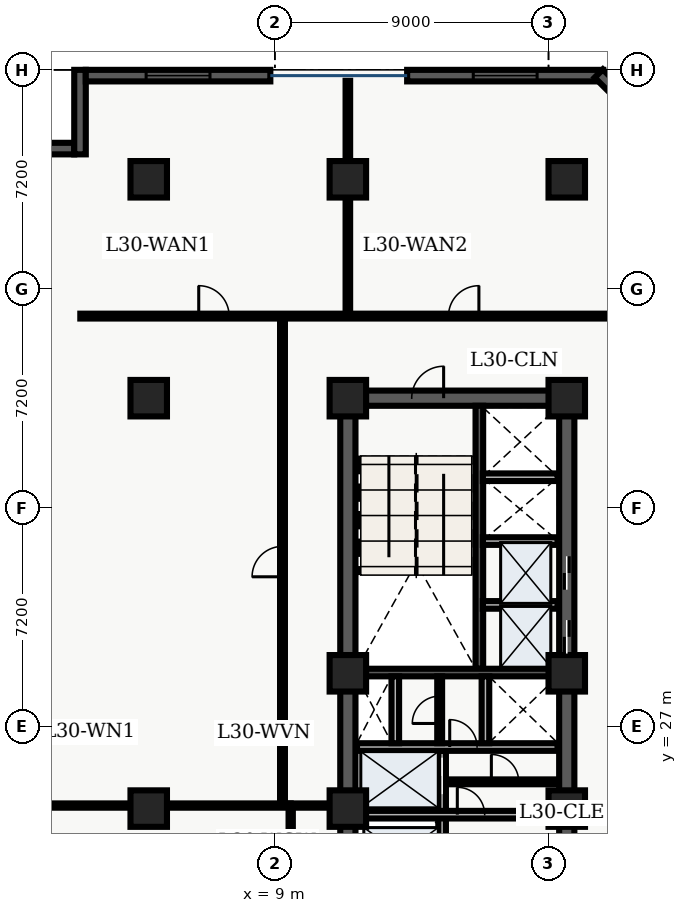
"""IFC4 building model, lengths in metres.
Left out: names, types, materials, properties, quantities, classifications, styles, units other than length and angle.
Written with IfcOpenShell. Run it as: python <this file> out.ifc"""

import sys

from ifc_helpers import new_model, entity, si_unit, converted_unit, direction, frame, origin_with_axes, origin_2d_with_axis, place, context, subcontext, project, spatial, polyline, rectangle, outline, extrude, element, fill, save


model = new_model("IFC4")
c1 = context("Model", 3, precision=1e-05, world=origin_with_axes(), true_north=direction((0.0, 1.0)))
c2 = subcontext(c1, "Body", "Model", "MODEL_VIEW")
j1 = project(units=[si_unit("LENGTHUNIT", "METRE"), converted_unit("PLANEANGLEUNIT", "DEGREE", entity("IfcPlaneAngleMeasure", 0.017), si_unit("PLANEANGLEUNIT", "RADIAN"), dimensions=[0, 0, 0, 0, 0, 0, 0])], contexts=[c1])
p1 = place(None, origin_with_axes())
s1 = spatial("IfcSite", under=j1, at=p1, CompositionType="ELEMENT")
p2 = place(p1, origin_with_axes())
s2 = spatial("IfcBuilding", under=s1, at=p2, CompositionType="ELEMENT")
p3 = place(p2, frame((0.0, 0.0, 124.2), z_axis=(0.0, 0.0, 1.0), x_axis=(1.0, 0.0, 0.0)))
s3 = spatial("IfcBuildingStorey", under=s2, at=p3, CompositionType="ELEMENT", Elevation=124.2)
p4 = place(p3, frame((11.4, 10.8, 0.0), z_axis=(0.0, 0.0, 1.0), x_axis=(0.0, 1.0, 0.0)))
e1 = element("IfcWall", 1, at=p4, inside=s3, PredefinedType="SHEAR", context=c2, shape_type="SweptSolid", body=[
    extrude(outline(polyline([(0.0, -0.25), (27.0, -0.25), (27.0, 0.25), (0.0, 0.25), (0.0, -0.25)])), origin_with_axes(), (0.0, 0.0, 1.0), 4.56),
])
p5 = place(p3, frame((11.4, 37.8, 0.0), z_axis=(0.0, 0.0, 1.0), x_axis=(1.0, 0.0, 0.0)))
e2 = element("IfcWall", 2, at=p5, inside=s3, PredefinedType="SHEAR", context=c2, shape_type="SweptSolid", body=[
    extrude(outline(polyline([(0.0, -0.25), (7.2, -0.25), (7.2, 0.25), (0.0, 0.25), (0.0, -0.25)])), origin_with_axes(), (0.0, 0.0, 1.0), 4.56),
])
p6 = place(p5, frame((2.625, 0.0, 0.0), z_axis=(0.0, 0.0, 1.0), x_axis=(1.0, 0.0, 0.0)))
e3 = element("IfcOpeningElement", 3, at=p6, cuts=e2, PredefinedType="OPENING", context=c2, shape_type="SweptSolid", body=[
    extrude(rectangle(XDim=1.05, YDim=0.52, at=origin_2d_with_axis()), origin_with_axes(), (0.0, 0.0, 1.0), 2.15),
])
p7 = place(p3, frame((18.6, 10.8, 0.0), z_axis=(0.0, 0.0, 1.0), x_axis=(0.0, 1.0, 0.0)))
e4 = element("IfcWall", 4, at=p7, inside=s3, PredefinedType="SHEAR", context=c2, shape_type="SweptSolid", body=[
    extrude(outline(polyline([(0.0, -0.25), (13.5, -0.25), (13.5, 0.25), (0.0, 0.25), (0.0, -0.25)])), origin_with_axes(), (0.0, 0.0, 1.0), 4.56),
])
p8 = place(p7, frame((5.6, 0.0, 0.0), z_axis=(0.0, 0.0, 1.0), x_axis=(1.0, 0.0, 0.0)))
e5 = element("IfcOpeningElement", 5, at=p8, cuts=e4, PredefinedType="OPENING", context=c2, shape_type="SweptSolid", body=[
    extrude(rectangle(XDim=1.1, YDim=0.52, at=origin_2d_with_axis()), origin_with_axes(), (0.0, 0.0, 1.0), 2.15),
])
p9 = place(p7, frame((7.8, 0.0, 0.0), z_axis=(0.0, 0.0, 1.0), x_axis=(1.0, 0.0, 0.0)))
e6 = element("IfcOpeningElement", 6, at=p9, cuts=e4, PredefinedType="OPENING", context=c2, shape_type="SweptSolid", body=[
    extrude(rectangle(XDim=1.1, YDim=0.52, at=origin_2d_with_axis()), origin_with_axes(), (0.0, 0.0, 1.0), 2.15),
])
p10 = place(p7, frame((11.125, 0.0, 0.0), z_axis=(0.0, 0.0, 1.0), x_axis=(1.0, 0.0, 0.0)))
e7 = element("IfcOpeningElement", 7, at=p10, cuts=e4, PredefinedType="OPENING", context=c2, shape_type="SweptSolid", body=[
    extrude(rectangle(XDim=1.05, YDim=0.52, at=origin_2d_with_axis()), origin_with_axes(), (0.0, 0.0, 1.0), 2.15),
])
p11 = place(p7, frame((2.425, 0.0, 0.0), z_axis=(0.0, 0.0, 1.0), x_axis=(1.0, 0.0, 0.0)))
e8 = element("IfcOpeningElement", 8, at=p11, cuts=e4, PredefinedType="OPENING", context=c2, shape_type="SweptSolid", body=[
    extrude(rectangle(XDim=1.05, YDim=0.52, at=origin_2d_with_axis()), origin_with_axes(), (0.0, 0.0, 1.0), 2.15),
])
p12 = place(p3, frame((18.6, 24.3, 0.0), z_axis=(0.0, 0.0, 1.0), x_axis=(0.0, 1.0, 0.0)))
e9 = element("IfcWall", 9, at=p12, inside=s3, PredefinedType="SHEAR", context=c2, shape_type="SweptSolid", body=[
    extrude(outline(polyline([(0.0, -0.25), (13.5, -0.25), (13.5, 0.25), (0.0, 0.25), (0.0, -0.25)])), origin_with_axes(), (0.0, 0.0, 1.0), 4.56),
])
p13 = place(p12, frame((5.65, 0.0, 0.0), z_axis=(0.0, 0.0, 1.0), x_axis=(1.0, 0.0, 0.0)))
e10 = element("IfcOpeningElement", 10, at=p13, cuts=e9, PredefinedType="OPENING", context=c2, shape_type="SweptSolid", body=[
    extrude(rectangle(XDim=1.1, YDim=0.52, at=origin_2d_with_axis()), origin_with_axes(), (0.0, 0.0, 1.0), 2.15),
])
p14 = place(p12, frame((7.75, 0.0, 0.0), z_axis=(0.0, 0.0, 1.0), x_axis=(1.0, 0.0, 0.0)))
e11 = element("IfcOpeningElement", 11, at=p14, cuts=e9, PredefinedType="OPENING", context=c2, shape_type="SweptSolid", body=[
    extrude(rectangle(XDim=1.1, YDim=0.52, at=origin_2d_with_axis()), origin_with_axes(), (0.0, 0.0, 1.0), 2.15),
])
p15 = place(p3, frame((15.725, 28.9, 0.0), z_axis=(0.0, 0.0, 1.0), x_axis=(0.0, 1.0, 0.0)))
e12 = element("IfcWall", 12, at=p15, inside=s3, PredefinedType="SHEAR", context=c2, shape_type="SweptSolid", body=[
    extrude(outline(polyline([(0.0, -0.125), (8.65, -0.125), (8.65, 0.125), (0.0, 0.125), (0.0, -0.125)])), origin_with_axes(), (0.0, 0.0, 1.0), 4.56),
])
p16 = place(p3, frame((11.65, 28.775, 0.0), z_axis=(0.0, 0.0, 1.0), x_axis=(1.0, 0.0, 0.0)))
e13 = element("IfcWall", 13, at=p16, inside=s3, PredefinedType="SHEAR", context=c2, shape_type="SweptSolid", body=[
    extrude(outline(polyline([(0.0, -0.125), (6.7, -0.125), (6.7, 0.125), (0.0, 0.125), (0.0, -0.125)])), origin_with_axes(), (0.0, 0.0, 1.0), 4.56),
])
p17 = place(p3, frame((14.5, 19.95, 0.0), z_axis=(0.0, 0.0, 1.0), x_axis=(0.0, 1.0, 0.0)))
e14 = element("IfcWall", 14, at=p17, inside=s3, PredefinedType="SOLIDWALL", context=c2, shape_type="SweptSolid", body=[
    extrude(outline(polyline([(0.0, -0.125), (6.25, -0.125), (6.25, 0.125), (0.0, 0.125), (0.0, -0.125)])), origin_with_axes(), (0.0, 0.0, 1.0), 3.6),
])
p18 = place(p17, frame((1.025, 0.0, 0.0), z_axis=(0.0, 0.0, 1.0), x_axis=(1.0, 0.0, 0.0)))
e15 = element("IfcOpeningElement", 15, at=p18, cuts=e14, PredefinedType="OPENING", context=c2, shape_type="SweptSolid", body=[
    extrude(rectangle(XDim=1.1, YDim=0.27, at=origin_2d_with_axis()), origin_with_axes(), (0.0, 0.0, 1.0), 2.15),
])
p19 = place(p17, frame((2.975, 0.0, 0.0), z_axis=(0.0, 0.0, 1.0), x_axis=(1.0, 0.0, 0.0)))
e16 = element("IfcOpeningElement", 16, at=p19, cuts=e14, PredefinedType="OPENING", context=c2, shape_type="SweptSolid", body=[
    extrude(rectangle(XDim=1.1, YDim=0.27, at=origin_2d_with_axis()), origin_with_axes(), (0.0, 0.0, 1.0), 2.15),
])
p20 = place(p17, frame((5.425, 0.0, 0.0), z_axis=(0.0, 0.0, 1.0), x_axis=(1.0, 0.0, 0.0)))
e17 = element("IfcOpeningElement", 17, at=p20, cuts=e14, PredefinedType="OPENING", context=c2, shape_type="SweptSolid", body=[
    extrude(rectangle(XDim=1.2, YDim=0.27, at=origin_2d_with_axis()), origin_with_axes(), (0.0, 0.0, 1.0), 2.15),
])
p21 = place(p3, frame((11.7, 24.1, 0.0), z_axis=(0.0, 0.0, 1.0), x_axis=(1.0, 0.0, 0.0)))
e18 = element("IfcWall", 18, at=p21, inside=s3, PredefinedType="SOLIDWALL", context=c2, shape_type="SweptSolid", body=[
    extrude(outline(polyline([(0.0, -0.125), (6.6, -0.125), (6.6, 0.125), (0.0, 0.125), (0.0, -0.125)])), origin_with_axes(), (0.0, 0.0, 1.0), 3.6),
])
p22 = place(p21, frame((3.75, 0.0, 0.0), z_axis=(0.0, 0.0, 1.0), x_axis=(1.0, 0.0, 0.0)))
e19 = element("IfcOpeningElement", 19, at=p22, cuts=e18, PredefinedType="OPENING", context=c2, shape_type="SweptSolid", body=[
    extrude(rectangle(XDim=0.9, YDim=0.27, at=origin_2d_with_axis()), origin_with_axes(), (0.0, 0.0, 1.0), 2.15),
])
p23 = place(p3, frame((11.7, 26.325, 0.0), z_axis=(0.0, 0.0, 1.0), x_axis=(1.0, 0.0, 0.0)))
e20 = element("IfcWall", 20, at=p23, inside=s3, PredefinedType="SOLIDWALL", context=c2, shape_type="SweptSolid", body=[
    extrude(outline(polyline([(0.0, -0.125), (6.6, -0.125), (6.6, 0.125), (0.0, 0.125), (0.0, -0.125)])), origin_with_axes(), (0.0, 0.0, 1.0), 3.6),
])
p24 = place(p23, frame((3.5, 0.0, 0.0), z_axis=(0.0, 0.0, 1.0), x_axis=(1.0, 0.0, 0.0)))
e21 = element("IfcOpeningElement", 21, at=p24, cuts=e20, PredefinedType="OPENING", context=c2, shape_type="SweptSolid", body=[
    extrude(rectangle(XDim=0.9, YDim=0.27, at=origin_2d_with_axis()), origin_with_axes(), (0.0, 0.0, 1.0), 2.15),
])
for number, where, z_axis, x_axis in (
    (22, (12.96, 26.45, 0.0), (0.0, 0.0, 1.0), (0.0, 1.0, 0.0)),
    (23, (15.925, 26.45, 0.0), (0.0, 0.0, 1.0), (0.0, 1.0, 0.0)),
):
    element("IfcWall", number, at=place(p3, frame(where, z_axis=z_axis, x_axis=x_axis)), inside=s3, PredefinedType="SOLIDWALL", context=c2, shape_type="SweptSolid", body=[
        extrude(outline(polyline([(0.0, -0.125), (2.2, -0.125), (2.2, 0.125), (0.0, 0.125), (0.0, -0.125)])), origin_with_axes(), (0.0, 0.0, 1.0), 3.6),
    ])
for number, where, z_axis, x_axis in (
    (24, (11.4, 24.3, 0.0), (0.0, 0.0, 1.0), (1.0, 0.0, 0.0)),
    (25, (11.4, 28.75, 0.0), (0.0, 0.0, 1.0), (1.0, 0.0, 0.0)),
    (26, (11.4, 37.8, 0.0), (0.0, 0.0, 1.0), (1.0, 0.0, 0.0)),
    (27, (11.4, 45.0, 0.0), (0.0, 0.0, 1.0), (1.0, 0.0, 0.0)),
    (28, (18.6, 24.3, 0.0), (0.0, 0.0, 1.0), (1.0, 0.0, 0.0)),
    (29, (18.6, 28.75, 0.0), (0.0, 0.0, 1.0), (1.0, 0.0, 0.0)),
    (30, (18.6, 37.8, 0.0), (0.0, 0.0, 1.0), (1.0, 0.0, 0.0)),
    (31, (18.6, 45.0, 0.0), (0.0, 0.0, 1.0), (1.0, 0.0, 0.0)),
    (32, (4.85, 24.3, 0.0), (0.0, 0.0, 1.0), (1.0, 0.0, 0.0)),
    (33, (4.85, 37.8, 0.0), (0.0, 0.0, 1.0), (1.0, 0.0, 0.0)),
    (34, (4.85, 45.0, 0.0), (0.0, 0.0, 1.0), (1.0, 0.0, 0.0)),
):
    element("IfcColumn", number, at=place(p3, frame(where, z_axis=z_axis, x_axis=x_axis)), inside=s3, PredefinedType="COLUMN", context=c2, shape_type="SweptSolid", body=[
        extrude(rectangle(XDim=1.2, YDim=1.2, at=origin_2d_with_axis()), origin_with_axes(), (0.0, 0.0, 1.0), 4.8),
    ])
p25 = place(p3, frame((14.62, 25.18, 0.0), z_axis=(0.0, 0.0, 1.0), x_axis=(1.0, 0.0, 0.0)))
e35 = element("IfcWall", 35, at=p25, inside=s3, PredefinedType="PARTITIONING", context=c2, shape_type="SweptSolid", body=[
    extrude(outline(polyline([(0.0, -0.08), (3.68, -0.08), (3.68, 0.08), (0.0, 0.08), (0.0, -0.08)])), origin_with_axes(), (0.0, 0.0, 1.0), 3.2),
])
p26 = place(p25, frame((1.95, 0.0, 0.0), z_axis=(0.0, 0.0, 1.0), x_axis=(1.0, 0.0, 0.0)))
e36 = element("IfcOpeningElement", 36, at=p26, cuts=e35, PredefinedType="OPENING", context=c2, shape_type="SweptSolid", body=[
    extrude(rectangle(XDim=0.9, YDim=0.18, at=origin_2d_with_axis()), origin_with_axes(), (0.0, 0.0, 1.0), 2.15),
])
p27 = place(p3, frame((14.42, 26.45, 0.0), z_axis=(0.0, 0.0, 1.0), x_axis=(0.0, 1.0, 0.0)))
e37 = element("IfcWall", 37, at=p27, inside=s3, PredefinedType="PARTITIONING", context=c2, shape_type="SweptSolid", body=[
    extrude(outline(polyline([(0.0, -0.08), (2.2, -0.08), (2.2, 0.08), (0.0, 0.08), (0.0, -0.08)])), origin_with_axes(), (0.0, 0.0, 1.0), 3.2),
])
p28 = place(p27, frame((1.1, 0.0, 0.0), z_axis=(0.0, 0.0, 1.0), x_axis=(1.0, 0.0, 0.0)))
e38 = element("IfcOpeningElement", 38, at=p28, cuts=e37, PredefinedType="OPENING", context=c2, shape_type="SweptSolid", body=[
    extrude(rectangle(XDim=0.9, YDim=0.18, at=origin_2d_with_axis()), origin_with_axes(), (0.0, 0.0, 1.0), 2.15),
])
for number, where, z_axis, x_axis in (
    (39, (15.84, 31.0, 0.0), (0.0, 0.0, 1.0), (1.0, 0.0, 0.0)),
    (40, (15.84, 33.1, 0.0), (0.0, 0.0, 1.0), (1.0, 0.0, 0.0)),
    (41, (15.84, 35.2, 0.0), (0.0, 0.0, 1.0), (1.0, 0.0, 0.0)),
):
    element("IfcWall", number, at=place(p3, frame(where, z_axis=z_axis, x_axis=x_axis)), inside=s3, PredefinedType="SOLIDWALL", context=c2, shape_type="SweptSolid", body=[
        extrude(outline(polyline([(0.0, -0.125), (2.46, -0.125), (2.46, 0.125), (0.0, 0.125), (0.0, -0.125)])), origin_with_axes(), (0.0, 0.0, 1.0), 3.2),
    ])
p29 = place(p3, frame((9.52, 20.4, 0.0), z_axis=(0.0, 0.0, 1.0), x_axis=(0.0, 1.0, 0.0)))
e42 = element("IfcWall", 42, at=p29, inside=s3, PredefinedType="PARTITIONING", context=c2, shape_type="SweptSolid", body=[
    extrude(outline(polyline([(0.0, -0.07), (4.0, -0.07), (4.0, 0.07), (0.0, 0.07), (0.0, -0.07)])), origin_with_axes(), (0.0, 0.0, 1.0), 3.2),
])
p30 = place(p3, frame((9.52, 24.4, 0.0), z_axis=(0.0, 0.0, 1.0), x_axis=(1.0, 0.0, 0.0)))
e43 = element("IfcWall", 43, at=p30, inside=s3, PredefinedType="PARTITIONING", context=c2, shape_type="SweptSolid", body=[
    extrude(outline(polyline([(0.0, -0.07), (1.58, -0.07), (1.58, 0.07), (0.0, 0.07), (0.0, -0.07)])), origin_with_axes(), (0.0, 0.0, 1.0), 3.2),
])
p31 = place(p3, frame((2.6, 40.5, 0.0), z_axis=(0.0, 0.0, 1.0), x_axis=(1.0, 0.0, 0.0)))
e44 = element("IfcWall", 44, at=p31, inside=s3, PredefinedType="PARTITIONING", context=c2, shape_type="SweptSolid", body=[
    extrude(outline(polyline([(0.0, -0.08), (18.65, -0.08), (18.65, 0.08), (0.0, 0.08), (0.0, -0.08)])), origin_with_axes(), (0.0, 0.0, 1.0), 3.2),
])
p32 = place(p31, frame((4.395, 0.0, 0.0), z_axis=(0.0, 0.0, 1.0), x_axis=(1.0, 0.0, 0.0)))
e45 = element("IfcOpeningElement", 45, at=p32, cuts=e44, PredefinedType="OPENING", context=c2, shape_type="SweptSolid", body=[
    extrude(rectangle(XDim=1.0, YDim=0.18, at=origin_2d_with_axis()), origin_with_axes(), (0.0, 0.0, 1.0), 2.15),
])
p33 = place(p31, frame((12.61, 0.0, 0.0), z_axis=(0.0, 0.0, 1.0), x_axis=(1.0, 0.0, 0.0)))
e46 = element("IfcOpeningElement", 46, at=p33, cuts=e44, PredefinedType="OPENING", context=c2, shape_type="SweptSolid", body=[
    extrude(rectangle(XDim=1.0, YDim=0.18, at=origin_2d_with_axis()), origin_with_axes(), (0.0, 0.0, 1.0), 2.15),
])
p34 = place(p3, frame((9.25, 24.4, 0.0), z_axis=(0.0, 0.0, 1.0), x_axis=(0.0, 1.0, 0.0)))
e47 = element("IfcWall", 47, at=p34, inside=s3, PredefinedType="PARTITIONING", context=c2, shape_type="SweptSolid", body=[
    extrude(outline(polyline([(0.0, -0.08), (16.1, -0.08), (16.1, 0.08), (0.0, 0.08), (0.0, -0.08)])), origin_with_axes(), (0.0, 0.0, 1.0), 3.2),
])
p35 = place(p34, frame((8.025, 0.0, 0.0), z_axis=(0.0, 0.0, 1.0), x_axis=(1.0, 0.0, 0.0)))
e48 = element("IfcOpeningElement", 48, at=p35, cuts=e47, PredefinedType="OPENING", context=c2, shape_type="SweptSolid", body=[
    extrude(rectangle(XDim=1.0, YDim=0.18, at=origin_2d_with_axis()), origin_with_axes(), (0.0, 0.0, 1.0), 2.15),
])
p36 = place(p3, frame((0.36, 24.4, 0.0), z_axis=(0.0, 0.0, 1.0), x_axis=(1.0, 0.0, 0.0)))
e49 = element("IfcWall", 49, at=p36, inside=s3, PredefinedType="PARTITIONING", context=c2, shape_type="SweptSolid", body=[
    extrude(outline(polyline([(0.0, -0.07), (9.16, -0.07), (9.16, 0.07), (0.0, 0.07), (0.0, -0.07)])), origin_with_axes(), (0.0, 0.0, 1.0), 3.2),
])
p37 = place(p3, frame((11.4, 40.6, 0.0), z_axis=(0.0, 0.0, 1.0), x_axis=(0.0, 1.0, 0.0)))
e50 = element("IfcWall", 50, at=p37, inside=s3, PredefinedType="PARTITIONING", context=c2, shape_type="SweptSolid", body=[
    extrude(outline(polyline([(0.0, -0.075), (7.64, -0.075), (7.64, 0.075), (0.0, 0.075), (0.0, -0.075)])), origin_with_axes(), (0.0, 0.0, 1.0), 3.2),
])
p38 = place(p3, frame((0.38, 46.01, 0.0), z_axis=(0.0, 0.0, 1.0), x_axis=(1.0, 0.0, 0.0)))
e51 = element("IfcWall", 51, at=p38, inside=s3, PredefinedType="SOLIDWALL", context=c2, shape_type="SweptSolid", body=[
    extrude(outline(polyline([(0.0, -0.19), (2.02, -0.19), (2.02, 0.19), (0.0, 0.19), (0.0, -0.19)])), origin_with_axes(), (0.0, 0.0, 1.0), 4.56),
])
p39 = place(p3, frame((2.59, 45.82, 0.0), z_axis=(0.0, 0.0, 1.0), x_axis=(0.0, 1.0, 0.0)))
e52 = element("IfcWall", 52, at=p39, inside=s3, PredefinedType="SOLIDWALL", context=c2, shape_type="SweptSolid", body=[
    extrude(outline(polyline([(0.0, -0.19), (2.78, -0.19), (2.78, 0.19), (0.0, 0.19), (0.0, -0.19)])), origin_with_axes(), (0.0, 0.0, 1.0), 4.56),
])
p40 = place(p3, frame((2.78, 48.41, 0.0), z_axis=(0.0, 0.0, 1.0), x_axis=(1.0, 0.0, 0.0)))
e53 = element("IfcWall", 53, at=p40, inside=s3, PredefinedType="SOLIDWALL", context=c2, shape_type="SweptSolid", body=[
    extrude(outline(polyline([(0.0, -0.19), (6.07, -0.19), (6.07, 0.19), (0.0, 0.19), (0.0, -0.19)])), origin_with_axes(), (0.0, 0.0, 1.0), 4.56),
])
p41 = place(p40, frame((3.035, 0.0, 0.45), z_axis=(0.0, 0.0, 1.0), x_axis=(1.0, 0.0, 0.0)))
e54 = element("IfcOpeningElement", 54, at=p41, cuts=e53, PredefinedType="OPENING", context=c2, shape_type="SweptSolid", body=[
    extrude(rectangle(XDim=2.1, YDim=0.4, at=origin_2d_with_axis()), origin_with_axes(), (0.0, 0.0, 1.0), 2.2),
])
p42 = place(p3, frame((13.35, 48.41, 0.0), z_axis=(0.0, 0.0, 1.0), x_axis=(1.0, 0.0, 0.0)))
e55 = element("IfcWall", 55, at=p42, inside=s3, PredefinedType="SOLIDWALL", context=c2, shape_type="SweptSolid", body=[
    extrude(outline(polyline([(0.0, -0.19), (6.45, -0.19), (6.45, 0.19), (0.0, 0.19), (0.0, -0.19)])), origin_with_axes(), (0.0, 0.0, 1.0), 4.56),
])
p43 = place(p42, frame((3.225, 0.0, 0.45), z_axis=(0.0, 0.0, 1.0), x_axis=(1.0, 0.0, 0.0)))
e56 = element("IfcOpeningElement", 56, at=p43, cuts=e55, PredefinedType="OPENING", context=c2, shape_type="SweptSolid", body=[
    extrude(rectangle(XDim=2.1, YDim=0.4, at=origin_2d_with_axis()), origin_with_axes(), (0.0, 0.0, 1.0), 2.2),
])
p44 = place(p3, frame((19.652, 48.48, 0.0), z_axis=(0.0, 0.0, 1.0), x_axis=(0.707107, -0.707107, 0.0)))
e57 = element("IfcWall", 57, at=p44, inside=s3, PredefinedType="SOLIDWALL", context=c2, shape_type="SweptSolid", body=[
    extrude(outline(polyline([(0.0, -0.19), (2.565, -0.19), (2.565, 0.19), (0.0, 0.19), (0.0, -0.19)])), origin_with_axes(), (0.0, 0.0, 1.0), 4.56),
])
p45 = place(p12, frame((5.65, 0.0, 0.0), z_axis=(0.0, 0.0, 1.0), x_axis=(1.0, 0.0, 0.0)))
e58 = element("IfcDoor", 58, at=p45, inside=s3, OperationType="SLIDING_TO_LEFT", PredefinedType="DOOR", context=c2, shape_type="SweptSolid", body=[
    extrude(rectangle(XDim=1.1, YDim=0.09, at=origin_2d_with_axis()), origin_with_axes(), (0.0, 0.0, 1.0), 2.15),
])
fill(e10, e58)
p46 = place(p12, frame((7.75, 0.0, 0.0), z_axis=(0.0, 0.0, 1.0), x_axis=(1.0, 0.0, 0.0)))
e59 = element("IfcDoor", 59, at=p46, inside=s3, OperationType="SLIDING_TO_RIGHT", PredefinedType="DOOR", context=c2, shape_type="SweptSolid", body=[
    extrude(rectangle(XDim=1.1, YDim=0.09, at=origin_2d_with_axis()), origin_with_axes(), (0.0, 0.0, 1.0), 2.15),
])
fill(e11, e59)
p47 = place(p17, frame((5.425, 0.0, 0.0), z_axis=(0.0, 0.0, 1.0), x_axis=(1.0, 0.0, 0.0)))
e60 = element("IfcDoor", 60, at=p47, inside=s3, OperationType="DOUBLE_DOOR_SLIDING", PredefinedType="DOOR", context=c2, shape_type="SweptSolid", body=[
    extrude(rectangle(XDim=1.2, YDim=0.09, at=origin_2d_with_axis()), origin_with_axes(), (0.0, 0.0, 1.0), 2.15),
])
fill(e17, e60)
p48 = place(p5, frame((2.625, 0.0, 0.0), z_axis=(0.0, 0.0, 1.0), x_axis=(1.0, 0.0, 0.0)))
e61 = element("IfcDoor", 61, at=p48, inside=s3, OperationType="SINGLE_SWING_RIGHT", PredefinedType="DOOR", context=c2, shape_type="SweptSolid", body=[
    extrude(rectangle(XDim=1.05, YDim=0.09, at=origin_2d_with_axis()), origin_with_axes(), (0.0, 0.0, 1.0), 2.15),
])
fill(e3, e61)
p49 = place(p23, frame((3.5, 0.0, 0.0), z_axis=(0.0, 0.0, 1.0), x_axis=(1.0, 0.0, 0.0)))
e62 = element("IfcDoor", 62, at=p49, inside=s3, OperationType="SINGLE_SWING_LEFT", PredefinedType="DOOR", context=c2, shape_type="SweptSolid", body=[
    extrude(rectangle(XDim=0.9, YDim=0.09, at=origin_2d_with_axis()), origin_with_axes(), (0.0, 0.0, 1.0), 2.15),
])
fill(e21, e62)
p50 = place(p27, frame((1.1, 0.0, 0.0), z_axis=(0.0, 0.0, 1.0), x_axis=(1.0, 0.0, 0.0)))
e63 = element("IfcDoor", 63, at=p50, inside=s3, OperationType="SINGLE_SWING_LEFT", PredefinedType="DOOR", context=c2, shape_type="SweptSolid", body=[
    extrude(rectangle(XDim=0.9, YDim=0.09, at=origin_2d_with_axis()), origin_with_axes(), (0.0, 0.0, 1.0), 2.15),
])
fill(e38, e63)
p51 = place(p21, frame((3.75, 0.0, 0.0), z_axis=(0.0, 0.0, 1.0), x_axis=(1.0, 0.0, 0.0)))
e64 = element("IfcDoor", 64, at=p51, inside=s3, OperationType="SINGLE_SWING_LEFT", PredefinedType="DOOR", context=c2, shape_type="SweptSolid", body=[
    extrude(rectangle(XDim=0.9, YDim=0.09, at=origin_2d_with_axis()), origin_with_axes(), (0.0, 0.0, 1.0), 2.15),
])
fill(e19, e64)
p52 = place(p25, frame((1.95, 0.0, 0.0), z_axis=(0.0, 0.0, 1.0), x_axis=(1.0, 0.0, 0.0)))
e65 = element("IfcDoor", 65, at=p52, inside=s3, OperationType="SINGLE_SWING_LEFT", PredefinedType="DOOR", context=c2, shape_type="SweptSolid", body=[
    extrude(rectangle(XDim=0.9, YDim=0.09, at=origin_2d_with_axis()), origin_with_axes(), (0.0, 0.0, 1.0), 2.15),
])
fill(e36, e65)
p53 = place(p34, frame((8.025, 0.0, 0.0), z_axis=(0.0, 0.0, 1.0), x_axis=(1.0, 0.0, 0.0)))
e66 = element("IfcDoor", 66, at=p53, inside=s3, OperationType="SINGLE_SWING_LEFT", PredefinedType="DOOR", context=c2, shape_type="SweptSolid", body=[
    extrude(rectangle(XDim=1.0, YDim=0.09, at=origin_2d_with_axis()), origin_with_axes(), (0.0, 0.0, 1.0), 2.15),
])
fill(e48, e66)
p54 = place(p31, frame((4.395, 0.0, 0.0), z_axis=(0.0, 0.0, 1.0), x_axis=(1.0, 0.0, 0.0)))
e67 = element("IfcDoor", 67, at=p54, inside=s3, OperationType="SINGLE_SWING_LEFT", PredefinedType="DOOR", context=c2, shape_type="SweptSolid", body=[
    extrude(rectangle(XDim=1.0, YDim=0.09, at=origin_2d_with_axis()), origin_with_axes(), (0.0, 0.0, 1.0), 2.15),
])
fill(e45, e67)
p55 = place(p31, frame((12.61, 0.0, 0.0), z_axis=(0.0, 0.0, 1.0), x_axis=(1.0, 0.0, 0.0)))
e68 = element("IfcDoor", 68, at=p55, inside=s3, OperationType="SINGLE_SWING_RIGHT", PredefinedType="DOOR", context=c2, shape_type="SweptSolid", body=[
    extrude(rectangle(XDim=1.0, YDim=0.09, at=origin_2d_with_axis()), origin_with_axes(), (0.0, 0.0, 1.0), 2.15),
])
fill(e46, e68)
p56 = place(p40, frame((3.035, 0.0, 0.45), z_axis=(0.0, 0.0, 1.0), x_axis=(1.0, 0.0, 0.0)))
e69 = element("IfcWindow", 69, at=p56, inside=s3, PredefinedType="WINDOW", context=c2, shape_type="SweptSolid", body=[
    extrude(rectangle(XDim=2.1, YDim=0.09, at=origin_2d_with_axis()), origin_with_axes(), (0.0, 0.0, 1.0), 2.2),
])
fill(e54, e69)
p57 = place(p42, frame((3.225, 0.0, 0.45), z_axis=(0.0, 0.0, 1.0), x_axis=(1.0, 0.0, 0.0)))
e70 = element("IfcWindow", 70, at=p57, inside=s3, PredefinedType="WINDOW", context=c2, shape_type="SweptSolid", body=[
    extrude(rectangle(XDim=2.1, YDim=0.09, at=origin_2d_with_axis()), origin_with_axes(), (0.0, 0.0, 1.0), 2.2),
])
fill(e56, e70)
save(model, sys.argv[1])
